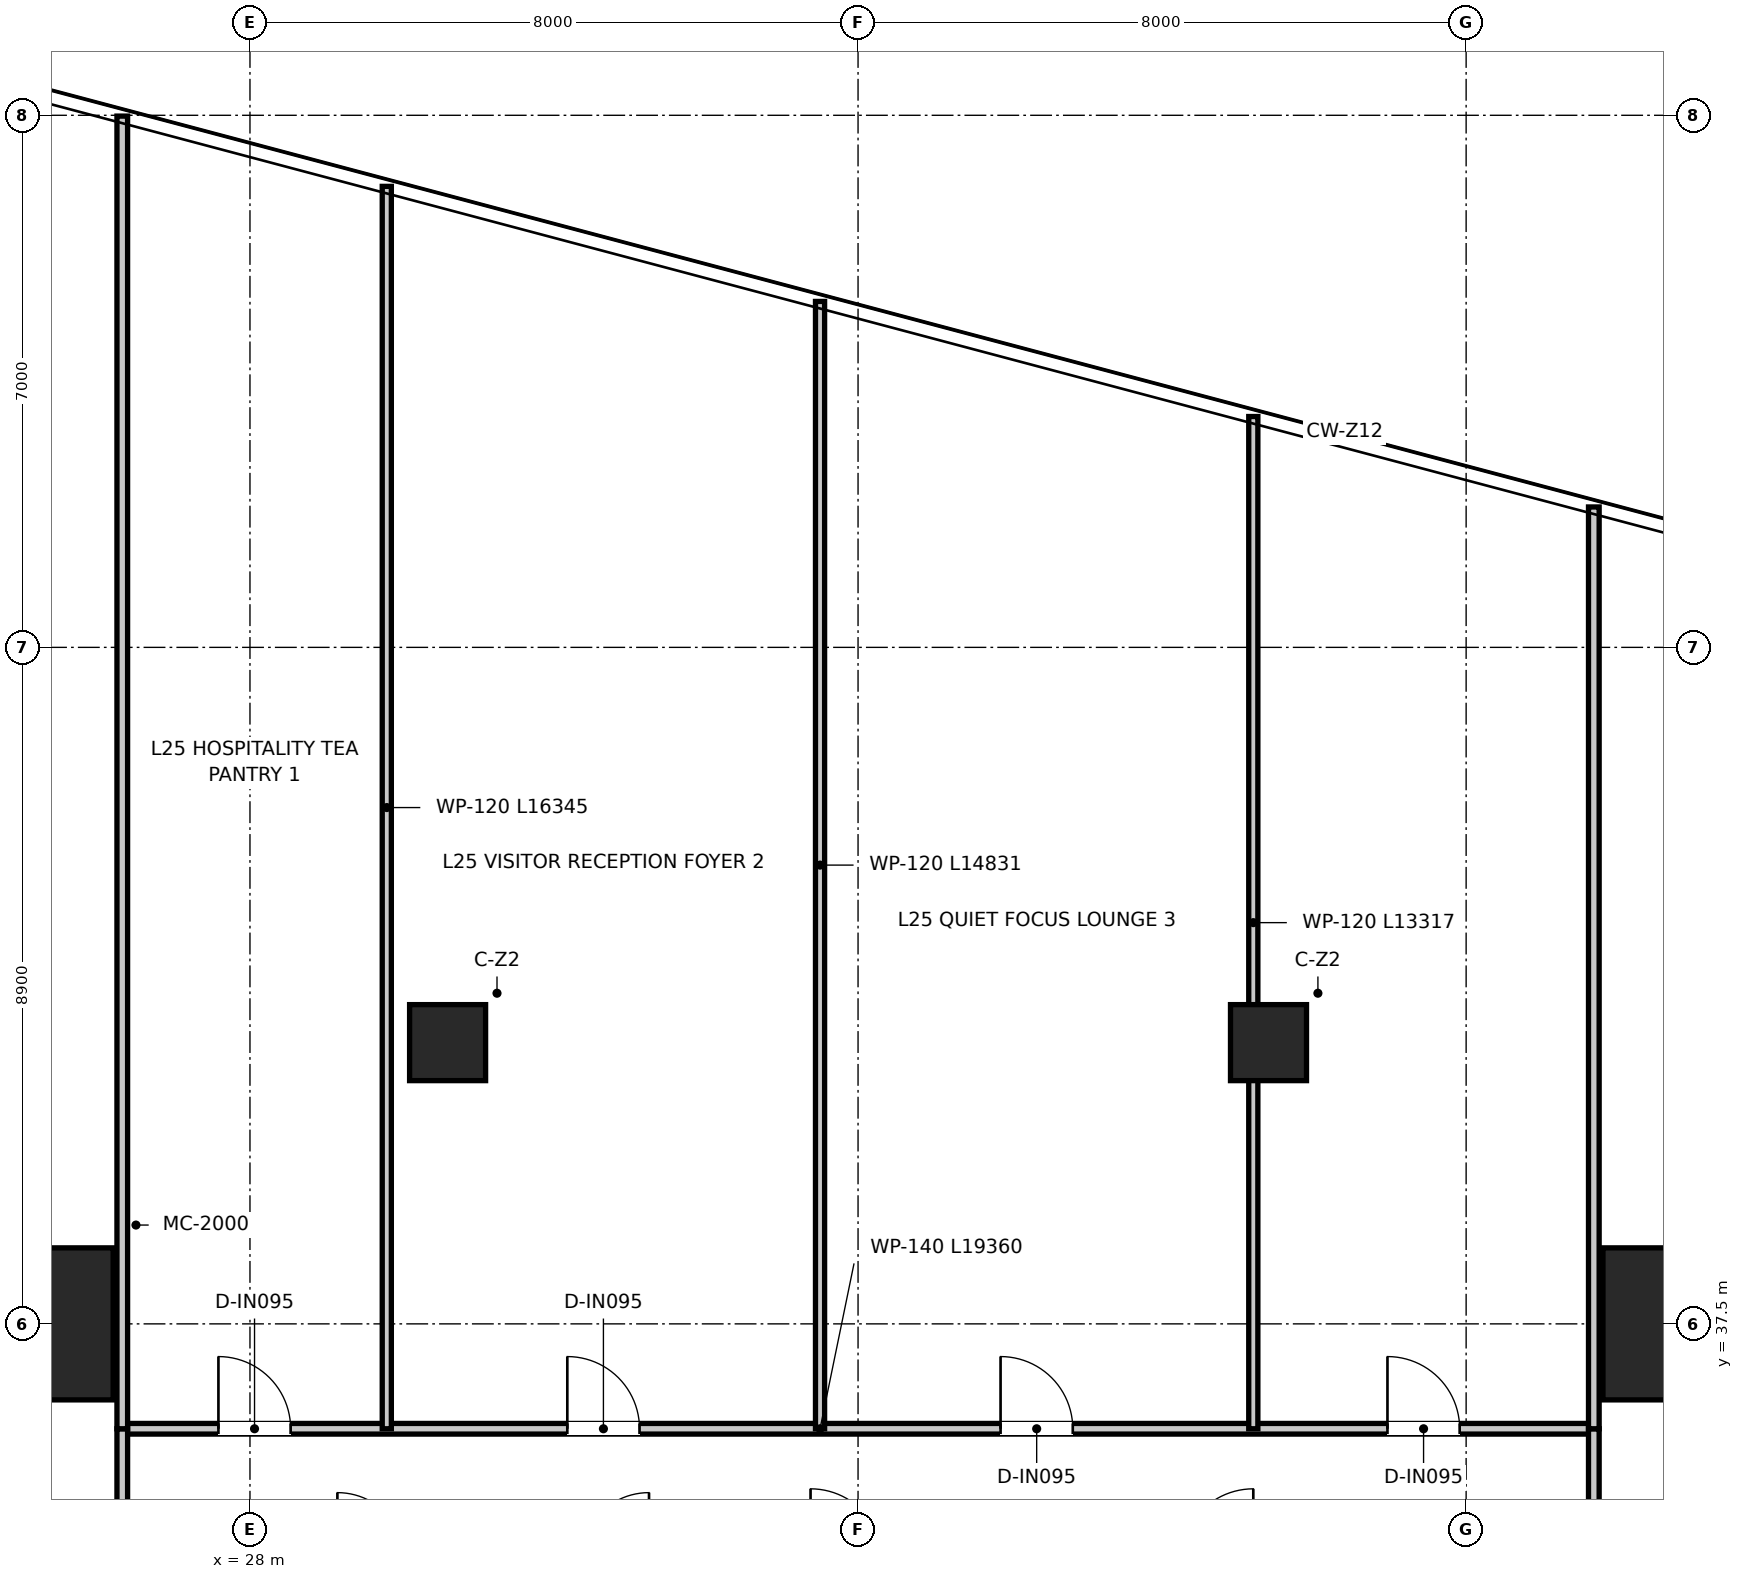
"""IFC4 building model, lengths in metres.
Left out: names, types, materials, properties, quantities, classifications, styles, units other than length and angle.
Written with IfcOpenShell. Run it as: python <this file> out.ifc"""

import sys

from ifc_helpers import new_model, si_unit, direction, frame, frame_2d, origin, origin_2d, place, context, subcontext, project, spatial, rectangle, extrude, source, transform, mapped, element, fill, save


model = new_model("IFC4")
c1 = context("Model", 3, precision=1e-05, world=origin(), true_north=direction((0.0, 1.0)))
c2 = subcontext(c1, "Body", "Model", "MODEL_VIEW")
j1 = project(units=[si_unit("LENGTHUNIT", "METRE"), si_unit("PLANEANGLEUNIT", "RADIAN")], contexts=[c1])
p1 = place(None, origin())
s1 = spatial("IfcSite", under=j1, at=p1, CompositionType="ELEMENT")
p2 = place(p1, origin())
s2 = spatial("IfcBuilding", under=s1, at=p2, CompositionType="ELEMENT")
p3 = place(p2, frame((0.0, 0.0, 105.85)))
s3 = spatial("IfcBuildingStorey", under=s2, at=p3, CompositionType="ELEMENT", Elevation=105.85)
m1 = source(origin(), c2, "Body", "SweptSolid", [
    extrude(rectangle(XDim=2.0, YDim=2.0, at=origin_2d()), origin(), (0.0, 0.0, 1.0), 3.95),
])
for number, where, z_axis, x_axis in (
    (1, (46.8, 37.5, 0.0), (0.0, 0.0, 1.0), (1.0, 0.0, 0.0)),
    (2, (25.2, 37.5, 0.0), (0.0, 0.0, 1.0), (1.0, 0.0, 0.0)),
):
    element("IfcColumn", number, at=place(p3, frame(where, z_axis=z_axis, x_axis=x_axis)), inside=s3, PredefinedType="USERDEFINED", context=c2, shape_type="MappedRepresentation", body=[
        mapped(m1, transform((0.0, 0.0, 0.0), x_axis=(1.0, 0.0, 0.0), y_axis=(0.0, 1.0, 0.0), z_axis=(0.0, 0.0, 1.0), scale=1.0)),
    ])
m2 = source(origin(), c2, "Body", "SweptSolid", [
    extrude(rectangle(XDim=1.0, YDim=1.0, at=origin_2d()), origin(), (0.0, 0.0, 1.0), 3.95),
])
for number, where, z_axis, x_axis in (
    (3, (30.6, 41.2, 0.0), (0.0, 0.0, 1.0), (1.0, 0.0, 0.0)),
    (4, (41.4, 41.2, 0.0), (0.0, 0.0, 1.0), (1.0, 0.0, 0.0)),
):
    element("IfcColumn", number, at=place(p3, frame(where, z_axis=z_axis, x_axis=x_axis)), inside=s3, PredefinedType="COLUMN", context=c2, shape_type="MappedRepresentation", body=[
        mapped(m2, transform((0.0, 0.0, 0.0), x_axis=(1.0, 0.0, 0.0), y_axis=(0.0, 1.0, 0.0), z_axis=(0.0, 0.0, 1.0), scale=1.0)),
    ])
p4 = place(p3, frame((26.32, 36.12, 0.0), z_axis=(0.0, 0.0, 1.0), x_axis=(1.0, 0.0, 0.0)))
e5 = element("IfcWall", 5, at=p4, inside=s3, PredefinedType="PARTITIONING", context=c2, shape_type="SweptSolid", body=[
    extrude(rectangle(XDim=19.36, YDim=0.14, at=frame_2d((9.68, 0.0))), origin(), (0.0, 0.0, 1.0), 3.08),
])
p5 = place(p4, frame((1.265, 0.0, 0.0)))
e6 = element("IfcOpeningElement", 6, at=p5, cuts=e5, PredefinedType="OPENING", context=c2, shape_type="SweptSolid", body=[
    extrude(rectangle(XDim=0.95, YDim=2.1, at=frame_2d((0.475, 1.05))), frame((0.0, 0.08, 0.0), z_axis=(0.0, -1.0, 0.0), x_axis=(1.0, 0.0, 0.0)), (0.0, 0.0, 1.0), 0.16),
])
p6 = place(p4, frame((5.855, 0.0, 0.0)))
e7 = element("IfcOpeningElement", 7, at=p6, cuts=e5, PredefinedType="OPENING", context=c2, shape_type="SweptSolid", body=[
    extrude(rectangle(XDim=0.95, YDim=2.1, at=frame_2d((0.475, 1.05))), frame((0.0, 0.08, 0.0), z_axis=(0.0, -1.0, 0.0), x_axis=(1.0, 0.0, 0.0)), (0.0, 0.0, 1.0), 0.16),
])
p7 = place(p4, frame((11.555, 0.0, 0.0)))
e8 = element("IfcOpeningElement", 8, at=p7, cuts=e5, PredefinedType="OPENING", context=c2, shape_type="SweptSolid", body=[
    extrude(rectangle(XDim=0.95, YDim=2.1, at=frame_2d((0.475, 1.05))), frame((0.0, 0.08, 0.0), z_axis=(0.0, -1.0, 0.0), x_axis=(1.0, 0.0, 0.0)), (0.0, 0.0, 1.0), 0.16),
])
p8 = place(p4, frame((16.645, 0.0, 0.0)))
e9 = element("IfcOpeningElement", 9, at=p8, cuts=e5, PredefinedType="OPENING", context=c2, shape_type="SweptSolid", body=[
    extrude(rectangle(XDim=0.95, YDim=2.1, at=frame_2d((0.475, 1.05))), frame((0.0, 0.08, 0.0), z_axis=(0.0, -1.0, 0.0), x_axis=(1.0, 0.0, 0.0)), (0.0, 0.0, 1.0), 0.16),
])
p9 = place(p3, frame((26.32, 10.5, 0.0), z_axis=(0.0, 0.0, 1.0), x_axis=(0.0, 1.0, 0.0)))
e10 = element("IfcWall", 10, at=p9, inside=s3, PredefinedType="PARTITIONING", context=c2, shape_type="SweptSolid", body=[
    extrude(rectangle(XDim=25.62, YDim=0.14, at=frame_2d((12.81, 0.0))), origin(), (0.0, 0.0, 1.0), 2.97),
])
p10 = place(p9, frame((11.775, 0.0, 0.0)))
e11 = element("IfcOpeningElement", 11, at=p10, cuts=e10, PredefinedType="OPENING", context=c2, shape_type="SweptSolid", body=[
    extrude(rectangle(XDim=0.95, YDim=2.1, at=frame_2d((0.475, 1.05))), frame((0.0, 0.08, 0.0), z_axis=(0.0, -1.0, 0.0), x_axis=(1.0, 0.0, 0.0)), (0.0, 0.0, 1.0), 0.16),
])
p11 = place(p9, frame((20.375, 0.0, 0.0)))
e12 = element("IfcOpeningElement", 12, at=p11, cuts=e10, PredefinedType="OPENING", context=c2, shape_type="SweptSolid", body=[
    extrude(rectangle(XDim=0.95, YDim=2.1, at=frame_2d((0.475, 1.05))), frame((0.0, 0.08, 0.0), z_axis=(0.0, -1.0, 0.0), x_axis=(1.0, 0.0, 0.0)), (0.0, 0.0, 1.0), 0.16),
])
p12 = place(p3, frame((45.68, 10.5, 0.0), z_axis=(0.0, 0.0, 1.0), x_axis=(0.0, 1.0, 0.0)))
e13 = element("IfcWall", 13, at=p12, inside=s3, PredefinedType="PARTITIONING", context=c2, shape_type="SweptSolid", body=[
    extrude(rectangle(XDim=25.62, YDim=0.14, at=frame_2d((12.81, 0.0))), origin(), (0.0, 0.0, 1.0), 2.97),
])
p13 = place(p12, frame((8.275, 0.0, 0.0)))
e14 = element("IfcOpeningElement", 14, at=p13, cuts=e13, PredefinedType="OPENING", context=c2, shape_type="SweptSolid", body=[
    extrude(rectangle(XDim=0.95, YDim=2.1, at=frame_2d((0.475, 1.05))), frame((0.0, 0.08, 0.0), z_axis=(0.0, -1.0, 0.0), x_axis=(1.0, 0.0, 0.0)), (0.0, 0.0, 1.0), 0.16),
])
p14 = place(p12, frame((14.025, 0.0, 0.0)))
e15 = element("IfcOpeningElement", 15, at=p14, cuts=e13, PredefinedType="OPENING", context=c2, shape_type="SweptSolid", body=[
    extrude(rectangle(XDim=0.95, YDim=2.1, at=frame_2d((0.475, 1.05))), frame((0.0, 0.08, 0.0), z_axis=(0.0, -1.0, 0.0), x_axis=(1.0, 0.0, 0.0)), (0.0, 0.0, 1.0), 0.16),
])
p15 = place(p12, frame((20.875, 0.0, 0.0)))
e16 = element("IfcOpeningElement", 16, at=p15, cuts=e13, PredefinedType="OPENING", context=c2, shape_type="SweptSolid", body=[
    extrude(rectangle(XDim=0.95, YDim=2.1, at=frame_2d((0.475, 1.05))), frame((0.0, 0.08, 0.0), z_axis=(0.0, -1.0, 0.0), x_axis=(1.0, 0.0, 0.0)), (0.0, 0.0, 1.0), 0.16),
])
p16 = place(p3, frame((26.32, 36.12, 0.0), z_axis=(0.0, 0.0, 1.0), x_axis=(0.0, 1.0, 0.0)))
e17 = element("IfcWall", 17, at=p16, inside=s3, PredefinedType="PARTITIONING", context=c2, shape_type="SweptSolid", body=[
    extrude(rectangle(XDim=17.269, YDim=0.14, at=frame_2d((8.635, 0.0))), origin(), (0.0, 0.0, 1.0), 2.97),
])
p17 = place(p3, frame((45.68, 36.12, 0.0), z_axis=(0.0, 0.0, 1.0), x_axis=(0.0, 1.0, 0.0)))
e18 = element("IfcWall", 18, at=p17, inside=s3, PredefinedType="PARTITIONING", context=c2, shape_type="SweptSolid", body=[
    extrude(rectangle(XDim=12.127, YDim=0.14, at=frame_2d((6.063, 0.0))), origin(), (0.0, 0.0, 1.0), 2.97),
])
p18 = place(p3, frame((29.8, 36.12, 0.0), z_axis=(0.0, 0.0, 1.0), x_axis=(0.0, 1.0, 0.0)))
e19 = element("IfcWall", 19, at=p18, inside=s3, PredefinedType="PARTITIONING", context=c2, shape_type="SweptSolid", body=[
    extrude(rectangle(XDim=16.345, YDim=0.12, at=frame_2d((8.172, 0.0))), origin(), (0.0, 0.0, 1.0), 2.97),
])
p19 = place(p3, frame((35.5, 36.12, 0.0), z_axis=(0.0, 0.0, 1.0), x_axis=(0.0, 1.0, 0.0)))
e20 = element("IfcWall", 20, at=p19, inside=s3, PredefinedType="PARTITIONING", context=c2, shape_type="SweptSolid", body=[
    extrude(rectangle(XDim=14.831, YDim=0.12, at=frame_2d((7.416, 0.0))), origin(), (0.0, 0.0, 1.0), 2.97),
])
p20 = place(p3, frame((41.2, 36.12, 0.0), z_axis=(0.0, 0.0, 1.0), x_axis=(0.0, 1.0, 0.0)))
e21 = element("IfcWall", 21, at=p20, inside=s3, PredefinedType="PARTITIONING", context=c2, shape_type="SweptSolid", body=[
    extrude(rectangle(XDim=13.317, YDim=0.12, at=frame_2d((6.658, 0.0))), origin(), (0.0, 0.0, 1.0), 2.97),
])
p21 = place(p5, origin())
e22 = element("IfcDoor", 22, at=p21, inside=s3, OperationType="SINGLE_SWING_LEFT", PredefinedType="DOOR", context=c2, shape_type="SweptSolid", body=[
    extrude(rectangle(XDim=0.95, YDim=2.1, at=frame_2d((0.475, 1.05))), frame((0.0, 0.025, 0.0), z_axis=(0.0, -1.0, 0.0), x_axis=(1.0, 0.0, 0.0)), (0.0, 0.0, 1.0), 0.05),
])
fill(e6, e22)
p22 = place(p6, origin())
e23 = element("IfcDoor", 23, at=p22, inside=s3, OperationType="SINGLE_SWING_LEFT", PredefinedType="DOOR", context=c2, shape_type="SweptSolid", body=[
    extrude(rectangle(XDim=0.95, YDim=2.1, at=frame_2d((0.475, 1.05))), frame((0.0, 0.025, 0.0), z_axis=(0.0, -1.0, 0.0), x_axis=(1.0, 0.0, 0.0)), (0.0, 0.0, 1.0), 0.05),
])
fill(e7, e23)
p23 = place(p7, origin())
e24 = element("IfcDoor", 24, at=p23, inside=s3, OperationType="SINGLE_SWING_LEFT", PredefinedType="DOOR", context=c2, shape_type="SweptSolid", body=[
    extrude(rectangle(XDim=0.95, YDim=2.1, at=frame_2d((0.475, 1.05))), frame((0.0, 0.025, 0.0), z_axis=(0.0, -1.0, 0.0), x_axis=(1.0, 0.0, 0.0)), (0.0, 0.0, 1.0), 0.05),
])
fill(e8, e24)
p24 = place(p8, origin())
e25 = element("IfcDoor", 25, at=p24, inside=s3, OperationType="SINGLE_SWING_LEFT", PredefinedType="DOOR", context=c2, shape_type="SweptSolid", body=[
    extrude(rectangle(XDim=0.95, YDim=2.1, at=frame_2d((0.475, 1.05))), frame((0.0, 0.025, 0.0), z_axis=(0.0, -1.0, 0.0), x_axis=(1.0, 0.0, 0.0)), (0.0, 0.0, 1.0), 0.05),
])
fill(e9, e25)
save(model, sys.argv[1])
